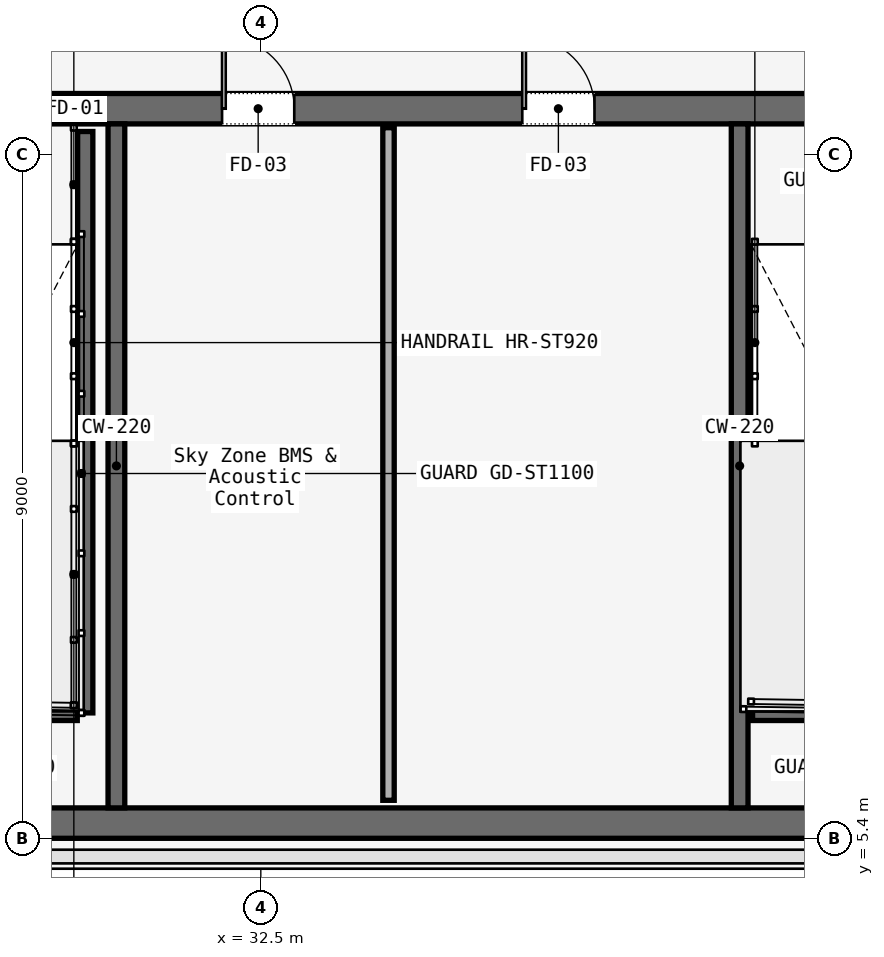
"""IFC4 building model, lengths in metres.
Left out: names, types, materials, properties, quantities, classifications, styles, units other than length and angle.
Written with IfcOpenShell. Run it as: python <this file> out.ifc"""

import sys

from ifc_helpers import new_model, si_unit, direction, frame, frame_2d, origin, place, context, subcontext, project, spatial, rectangle, extrude, element, fill, save


model = new_model("IFC4")
c1 = context("Model", 3, precision=1e-05, world=origin(), true_north=direction((0.0, 1.0)))
c2 = subcontext(c1, "Body", "Model", "MODEL_VIEW")
j1 = project(units=[si_unit("LENGTHUNIT", "METRE"), si_unit("PLANEANGLEUNIT", "RADIAN")], contexts=[c1])
p1 = place(None, origin())
s1 = spatial("IfcSite", under=j1, at=p1, CompositionType="ELEMENT")
p2 = place(p1, origin())
s2 = spatial("IfcBuilding", under=s1, at=p2, CompositionType="ELEMENT")
p3 = place(p2, frame((0.0, 0.0, 244.6)))
s3 = spatial("IfcBuildingStorey", under=s2, at=p3, CompositionType="ELEMENT", Elevation=244.6)
p4 = place(p3, frame((26.45, 15.0, 0.0), z_axis=(0.0, 0.0, 1.0), x_axis=(1.0, 0.0, 0.0)))
e1 = element("IfcWall", 1, at=p4, inside=s3, PredefinedType="SOLIDWALL", context=c2, shape_type="SweptSolid", body=[
    extrude(rectangle(XDim=31.1, YDim=0.4, at=frame_2d((15.55, 0.0))), origin(), (0.0, 0.0, 1.0), 3.58),
])
p5 = place(p4, frame((1.65, 0.0, 0.0)))
e2 = element("IfcOpeningElement", 2, at=p5, cuts=e1, PredefinedType="OPENING", context=c2, shape_type="SweptSolid", body=[
    extrude(rectangle(XDim=1.1, YDim=2.2, at=frame_2d((0.55, 1.1))), frame((0.0, 0.2, 0.0), z_axis=(0.0, -1.0, 0.0), x_axis=(1.0, 0.0, 0.0)), (0.0, 0.0, 1.0), 0.4),
])
p6 = place(p4, frame((13.65, 0.0, 0.0)))
e3 = element("IfcOpeningElement", 3, at=p6, cuts=e1, PredefinedType="OPENING", context=c2, shape_type="SweptSolid", body=[
    extrude(rectangle(XDim=1.1, YDim=2.2, at=frame_2d((0.55, 1.1))), frame((0.0, 0.2, 0.0), z_axis=(0.0, -1.0, 0.0), x_axis=(1.0, 0.0, 0.0)), (0.0, 0.0, 1.0), 0.4),
])
p7 = place(p4, frame((25.55, 0.0, 0.0)))
e4 = element("IfcOpeningElement", 4, at=p7, cuts=e1, PredefinedType="OPENING", context=c2, shape_type="SweptSolid", body=[
    extrude(rectangle(XDim=1.1, YDim=2.2, at=frame_2d((0.55, 1.1))), frame((0.0, 0.2, 0.0), z_axis=(0.0, -1.0, 0.0), x_axis=(1.0, 0.0, 0.0)), (0.0, 0.0, 1.0), 0.4),
])
p8 = place(p4, frame((19.35, 0.0, 0.0)))
e5 = element("IfcOpeningElement", 5, at=p8, cuts=e1, PredefinedType="OPENING", context=c2, shape_type="SweptSolid", body=[
    extrude(rectangle(XDim=1.1, YDim=2.2, at=frame_2d((0.55, 1.1))), frame((0.0, 0.2, 0.0), z_axis=(0.0, -1.0, 0.0), x_axis=(1.0, 0.0, 0.0)), (0.0, 0.0, 1.0), 0.4),
])
p9 = place(p4, frame((21.4, 0.0, 0.0)))
e6 = element("IfcOpeningElement", 6, at=p9, cuts=e1, PredefinedType="OPENING", context=c2, shape_type="SweptSolid", body=[
    extrude(rectangle(XDim=0.9, YDim=2.1, at=frame_2d((0.45, 1.05))), frame((0.0, 0.2, 0.0), z_axis=(0.0, -1.0, 0.0), x_axis=(1.0, 0.0, 0.0)), (0.0, 0.0, 1.0), 0.4),
])
p10 = place(p4, frame((5.54, 0.0, 0.0)))
e7 = element("IfcOpeningElement", 7, at=p10, cuts=e1, PredefinedType="OPENING", context=c2, shape_type="SweptSolid", body=[
    extrude(rectangle(XDim=0.95, YDim=2.2, at=frame_2d((0.475, 1.1))), frame((0.0, 0.2, 0.0), z_axis=(0.0, -1.0, 0.0), x_axis=(1.0, 0.0, 0.0)), (0.0, 0.0, 1.0), 0.4),
])
p11 = place(p4, frame((9.49, 0.0, 0.0)))
e8 = element("IfcOpeningElement", 8, at=p11, cuts=e1, PredefinedType="OPENING", context=c2, shape_type="SweptSolid", body=[
    extrude(rectangle(XDim=0.95, YDim=2.2, at=frame_2d((0.475, 1.1))), frame((0.0, 0.2, 0.0), z_axis=(0.0, -1.0, 0.0), x_axis=(1.0, 0.0, 0.0)), (0.0, 0.0, 1.0), 0.4),
])
p12 = place(p4, frame((23.35, 0.0, 0.0)))
e9 = element("IfcOpeningElement", 9, at=p12, cuts=e1, PredefinedType="OPENING", context=c2, shape_type="SweptSolid", body=[
    extrude(rectangle(XDim=1.3, YDim=2.3, at=frame_2d((0.65, 1.15))), frame((0.0, 0.2, 0.0), z_axis=(0.0, -1.0, 0.0), x_axis=(1.0, 0.0, 0.0)), (0.0, 0.0, 1.0), 0.4),
])
p13 = place(p3, frame((26.45, 5.6, 0.0), z_axis=(0.0, 0.0, 1.0), x_axis=(1.0, 0.0, 0.0)))
e10 = element("IfcWall", 10, at=p13, inside=s3, PredefinedType="SOLIDWALL", context=c2, shape_type="SweptSolid", body=[
    extrude(rectangle(XDim=31.1, YDim=0.4, at=frame_2d((15.55, 0.0))), origin(), (0.0, 0.0, 1.0), 3.58),
])
for number, where, z_axis, x_axis in (
    (11, (30.6, 5.8, 0.0), (0.0, 0.0, 1.0), (0.0, 1.0, 0.0)),
    (12, (38.8, 5.8, 0.0), (0.0, 0.0, 1.0), (0.0, 1.0, 0.0)),
):
    element("IfcWall", number, at=place(p3, frame(where, z_axis=z_axis, x_axis=x_axis)), inside=s3, PredefinedType="SOLIDWALL", context=c2, shape_type="SweptSolid", body=[
        extrude(rectangle(XDim=9.0, YDim=0.22, at=frame_2d((4.5, 0.0))), origin(), (0.0, 0.0, 1.0), 3.58),
    ])
p14 = place(p3, frame((30.19, 14.7, 0.0), z_axis=(0.0, 0.0, 1.0), x_axis=(0.0, -1.0, 0.0)))
e13 = element("IfcWall", 13, at=p14, inside=s3, PredefinedType="SOLIDWALL", context=c2, shape_type="SweptSolid", body=[
    extrude(rectangle(XDim=7.65, YDim=0.2, at=frame_2d((3.825, 0.0))), origin(), (0.0, 0.0, 1.0), 3.8),
])
for number, where, z_axis, x_axis in (
    (14, (26.97, 7.05, 0.0), (0.0, 0.0, 1.0), (1.0, 0.0, 0.0)),
    (15, (38.97, 7.05, 0.0), (0.0, 0.0, 1.0), (1.0, 0.0, 0.0)),
):
    element("IfcWall", number, at=place(p3, frame(where, z_axis=z_axis, x_axis=x_axis)), inside=s3, PredefinedType="SOLIDWALL", context=c2, shape_type="SweptSolid", body=[
        extrude(rectangle(XDim=3.115, YDim=0.2, at=frame_2d((1.558, 0.0))), origin(), (0.0, 0.0, 1.0), 3.8),
    ])
p15 = place(p3, frame((34.18, 5.9, 0.0), z_axis=(0.0, 0.0, 1.0), x_axis=(0.0, 1.0, 0.0)))
e16 = element("IfcWall", 16, at=p15, inside=s3, PredefinedType="PARTITIONING", context=c2, shape_type="SweptSolid", body=[
    extrude(rectangle(XDim=8.85, YDim=0.15, at=frame_2d((4.425, 0.0))), origin(), (0.0, 0.0, 1.0), 3.01),
])
p16 = place(p10, origin())
e17 = element("IfcDoor", 17, at=p16, inside=s3, OperationType="SINGLE_SWING_LEFT", PredefinedType="DOOR", context=c2, shape_type="SweptSolid", body=[
    extrude(rectangle(XDim=0.95, YDim=2.2, at=frame_2d((0.475, 1.1))), frame((0.0, 0.025, 0.0), z_axis=(0.0, -1.0, 0.0), x_axis=(1.0, 0.0, 0.0)), (0.0, 0.0, 1.0), 0.05),
])
fill(e7, e17)
p17 = place(p11, origin())
e18 = element("IfcDoor", 18, at=p17, inside=s3, OperationType="SINGLE_SWING_RIGHT", PredefinedType="DOOR", context=c2, shape_type="SweptSolid", body=[
    extrude(rectangle(XDim=0.95, YDim=2.2, at=frame_2d((0.475, 1.1))), frame((0.0, 0.025, 0.0), z_axis=(0.0, -1.0, 0.0), x_axis=(1.0, 0.0, 0.0)), (0.0, 0.0, 1.0), 0.05),
])
fill(e8, e18)
save(model, sys.argv[1])
